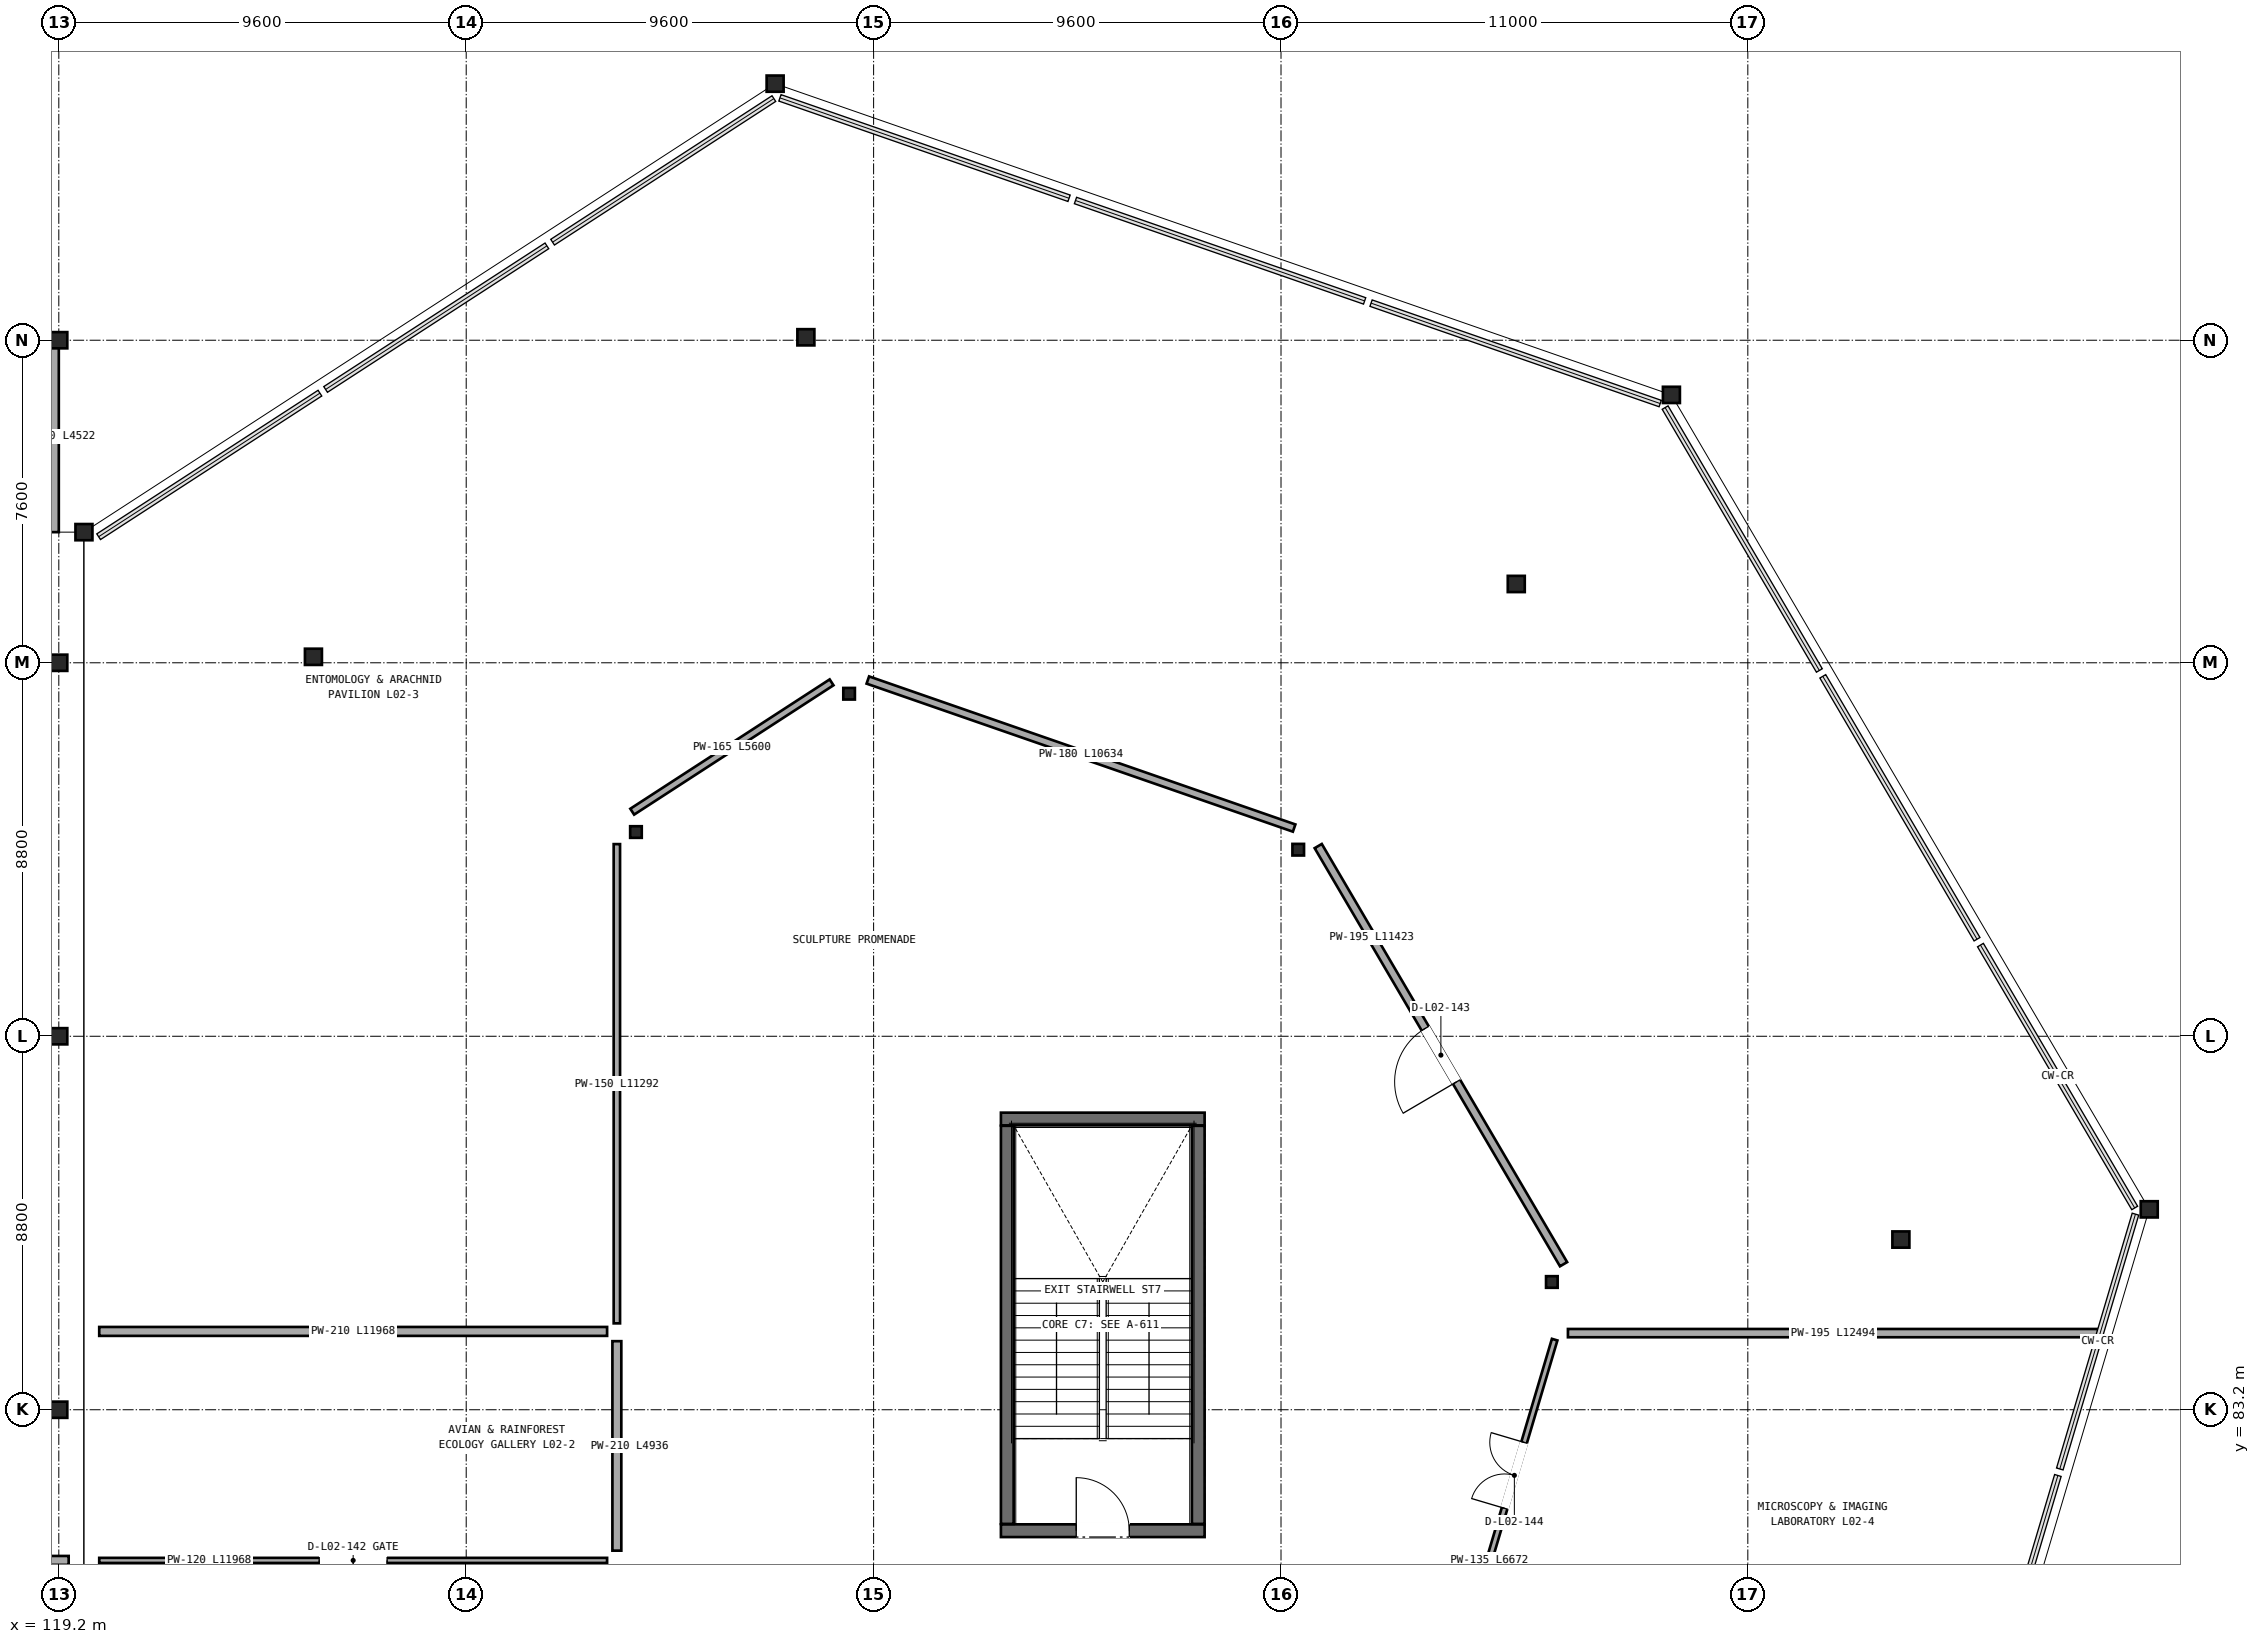
"""IFC4 building model, lengths in metres.
Left out: names, types, materials, properties, quantities, classifications, styles, units other than length and angle.
Written with IfcOpenShell. Run it as: python <this file> out.ifc"""

import sys

from ifc_helpers import new_model, si_unit, direction, frame, frame_2d, origin, origin_2d, place, context, subcontext, project, spatial, rectangle, hollow_circle, i_section, extrude, element, fill, save


model = new_model("IFC4")
c1 = context("Model", 3, precision=1e-05, world=origin(), true_north=direction((0.0, 1.0)))
c2 = subcontext(c1, "Body", "Model", "MODEL_VIEW")
j1 = project(units=[si_unit("LENGTHUNIT", "METRE"), si_unit("PLANEANGLEUNIT", "RADIAN")], contexts=[c1])
p1 = place(None, origin())
s1 = spatial("IfcSite", under=j1, at=p1, CompositionType="ELEMENT")
p2 = place(p1, origin())
s2 = spatial("IfcBuilding", under=s1, at=p2, CompositionType="ELEMENT")
p3 = place(p2, frame((0.0, 0.0, 10.1)))
s3 = spatial("IfcBuildingStorey", under=s2, at=p3, CompositionType="ELEMENT", Elevation=10.1)
for number, where, z_axis, x_axis in (
    (1, (119.2, 83.2, 0.0), (0.0, 0.0, 1.0), (1.0, 0.0, 0.0)),
    (2, (119.2, 92.0, 0.0), (0.0, 0.0, 1.0), (1.0, 0.0, 0.0)),
    (3, (119.2, 100.8, 0.0), (0.0, 0.0, 1.0), (1.0, 0.0, 0.0)),
    (4, (119.2, 108.4, 0.0), (0.0, 0.0, 1.0), (1.0, 0.0, 0.0)),
):
    element("IfcColumn", number, at=place(p3, frame(where, z_axis=z_axis, x_axis=x_axis)), inside=s3, PredefinedType="COLUMN", context=c2, shape_type="SweptSolid", body=[
        extrude(i_section(OverallWidth=0.4, OverallDepth=0.382, WebThickness=0.025, FlangeThickness=0.036, at=origin_2d()), origin(), (0.0, 0.0, 1.0), 4.5),
    ])
p4 = place(p3, frame((168.459, 87.922, 0.0), z_axis=(-0.141077174184, -0.017184886083, 0.989849438356), x_axis=(0.120918155191, -0.992662480275, 0.0)))
e5 = element("IfcColumn", 5, at=p4, inside=s3, PredefinedType="COLUMN", context=c2, shape_type="SweptSolid", body=[
    extrude(i_section(OverallWidth=0.4, OverallDepth=0.382, WebThickness=0.025, FlangeThickness=0.036, at=origin_2d()), origin(), (0.0, 0.0, 1.0), 4.546),
])
p5 = place(p3, frame((162.607, 87.21, 0.0), z_axis=(0.0, 0.0, 1.0), x_axis=(1.0, 0.0, 0.0)))
e6 = element("IfcColumn", 6, at=p5, inside=s3, PredefinedType="COLUMN", context=c2, shape_type="SweptSolid", body=[
    extrude(i_section(OverallWidth=0.4, OverallDepth=0.382, WebThickness=0.025, FlangeThickness=0.036, at=origin_2d()), origin(), (0.0, 0.0, 1.0), 4.5),
])
p6 = place(p3, frame((154.382, 86.21, 0.0), z_axis=(0.0, 0.0, 1.0), x_axis=(1.0, 0.0, 0.0)))
e7 = element("IfcColumn", 7, at=p6, inside=s3, PredefinedType="COLUMN", context=c2, shape_type="SweptSolid", body=[
    extrude(hollow_circle(Radius=0.136, WallThickness=0.009, at=origin_2d()), origin(), (0.0, 0.0, 1.0), 4.5),
])
p7 = place(p3, frame((157.199, 107.112, 0.0), z_axis=(-0.088165746855, -0.107453682943, 0.990293142006), x_axis=(0.773078230677, -0.63431068827, 0.0)))
e8 = element("IfcColumn", 8, at=p7, inside=s3, PredefinedType="COLUMN", context=c2, shape_type="SweptSolid", body=[
    extrude(i_section(OverallWidth=0.4, OverallDepth=0.382, WebThickness=0.025, FlangeThickness=0.036, at=origin_2d()), origin(), (0.0, 0.0, 1.0), 4.544),
])
p8 = place(p3, frame((153.544, 102.657, 0.0), z_axis=(0.0, 0.0, 1.0), x_axis=(1.0, 0.0, 0.0)))
e9 = element("IfcColumn", 9, at=p8, inside=s3, PredefinedType="COLUMN", context=c2, shape_type="SweptSolid", body=[
    extrude(i_section(OverallWidth=0.4, OverallDepth=0.382, WebThickness=0.025, FlangeThickness=0.036, at=origin_2d()), origin(), (0.0, 0.0, 1.0), 4.5),
])
p9 = place(p3, frame((148.406, 96.396, 0.0), z_axis=(0.0, 0.0, 1.0), x_axis=(1.0, 0.0, 0.0)))
e10 = element("IfcColumn", 10, at=p9, inside=s3, PredefinedType="COLUMN", context=c2, shape_type="SweptSolid", body=[
    extrude(hollow_circle(Radius=0.136, WallThickness=0.009, at=origin_2d()), origin(), (0.0, 0.0, 1.0), 4.5),
])
p10 = place(p3, frame((136.079, 114.445, 0.0), z_axis=(0.017445974662, -0.143969550907, 0.989428323013), x_axis=(0.99273780119, 0.120298204842, 0.0)))
e11 = element("IfcColumn", 11, at=p10, inside=s3, PredefinedType="COLUMN", context=c2, shape_type="SweptSolid", body=[
    extrude(i_section(OverallWidth=0.4, OverallDepth=0.382, WebThickness=0.025, FlangeThickness=0.036, at=origin_2d()), origin(), (0.0, 0.0, 1.0), 4.548),
])
p11 = place(p3, frame((136.804, 108.469, 0.0), z_axis=(0.0, 0.0, 1.0), x_axis=(1.0, 0.0, 0.0)))
e12 = element("IfcColumn", 12, at=p11, inside=s3, PredefinedType="COLUMN", context=c2, shape_type="SweptSolid", body=[
    extrude(i_section(OverallWidth=0.4, OverallDepth=0.382, WebThickness=0.025, FlangeThickness=0.036, at=origin_2d()), origin(), (0.0, 0.0, 1.0), 4.5),
])
p12 = place(p3, frame((137.823, 100.071, 0.0), z_axis=(0.0, 0.0, 1.0), x_axis=(1.0, 0.0, 0.0)))
e13 = element("IfcColumn", 13, at=p12, inside=s3, PredefinedType="COLUMN", context=c2, shape_type="SweptSolid", body=[
    extrude(hollow_circle(Radius=0.136, WallThickness=0.009, at=origin_2d()), origin(), (0.0, 0.0, 1.0), 4.5),
])
p13 = place(p3, frame((119.792, 103.878, 0.0), z_axis=(0.13021951526, -0.070716654764, 0.988960076335), x_axis=(0.477227696061, 0.878779680075, 0.0)))
e14 = element("IfcColumn", 14, at=p13, inside=s3, PredefinedType="COLUMN", context=c2, shape_type="SweptSolid", body=[
    extrude(i_section(OverallWidth=0.4, OverallDepth=0.382, WebThickness=0.025, FlangeThickness=0.036, at=origin_2d()), origin(), (0.0, 0.0, 1.0), 4.55),
])
p14 = place(p3, frame((125.2, 100.941, 0.0), z_axis=(0.0, 0.0, 1.0), x_axis=(1.0, 0.0, 0.0)))
e15 = element("IfcColumn", 15, at=p14, inside=s3, PredefinedType="COLUMN", context=c2, shape_type="SweptSolid", body=[
    extrude(i_section(OverallWidth=0.4, OverallDepth=0.382, WebThickness=0.025, FlangeThickness=0.036, at=origin_2d()), origin(), (0.0, 0.0, 1.0), 4.5),
])
p15 = place(p3, frame((132.8, 96.812, 0.0), z_axis=(0.0, 0.0, 1.0), x_axis=(1.0, 0.0, 0.0)))
e16 = element("IfcColumn", 16, at=p15, inside=s3, PredefinedType="COLUMN", context=c2, shape_type="SweptSolid", body=[
    extrude(hollow_circle(Radius=0.136, WallThickness=0.009, at=origin_2d()), origin(), (0.0, 0.0, 1.0), 4.5),
])
p16 = place(p3, frame((118.99, 103.878, 0.0), z_axis=(0.0, 0.0, 1.0), x_axis=(0.0, 1.0, 0.0)))
e17 = element("IfcWall", 17, at=p16, inside=s3, PredefinedType="SOLIDWALL", context=c2, shape_type="SweptSolid", body=[
    extrude(rectangle(XDim=4.522, YDim=0.42, at=frame_2d((2.261, 0.0))), origin(), (0.0, 0.0, 1.0), 3.628),
])
p17 = place(p3, frame((141.4, 80.35, 0.0), z_axis=(0.0, 0.0, 1.0), x_axis=(1.0, 0.0, 0.0)))
e18 = element("IfcWall", 18, at=p17, inside=s3, PredefinedType="SHEAR", context=c2, shape_type="SweptSolid", body=[
    extrude(rectangle(XDim=4.8, YDim=0.3, at=frame_2d((2.4, 0.0))), origin(), (0.0, 0.0, 1.0), 4.235),
])
p18 = place(p17, frame((1.775, 0.0, 0.0)))
e19 = element("IfcOpeningElement", 19, at=p18, cuts=e18, PredefinedType="OPENING", context=c2, shape_type="SweptSolid", body=[
    extrude(rectangle(XDim=1.25, YDim=2.2, at=frame_2d((0.625, 1.1))), frame((0.0, 0.16, 0.0), z_axis=(0.0, -1.0, 0.0), x_axis=(1.0, 0.0, 0.0)), (0.0, 0.0, 1.0), 0.32),
])
p19 = place(p3, frame((146.2, 90.05, 0.0), z_axis=(0.0, 0.0, 1.0), x_axis=(-1.0, 0.0, 0.0)))
e20 = element("IfcWall", 20, at=p19, inside=s3, PredefinedType="SHEAR", context=c2, shape_type="SweptSolid", body=[
    extrude(rectangle(XDim=4.8, YDim=0.3, at=frame_2d((2.4, 0.0))), origin(), (0.0, 0.0, 1.0), 4.235),
])
for number, where, z_axis, x_axis in (
    (21, (146.05, 80.51, 0.0), (0.0, 0.0, 1.0), (0.0, 1.0, 0.0)),
    (22, (141.55, 89.89, 0.0), (0.0, 0.0, 1.0), (0.0, -1.0, 0.0)),
):
    element("IfcWall", number, at=place(p3, frame(where, z_axis=z_axis, x_axis=x_axis)), inside=s3, PredefinedType="SHEAR", context=c2, shape_type="SweptSolid", body=[
        extrude(rectangle(XDim=9.38, YDim=0.3, at=frame_2d((4.69, 0.0))), origin(), (0.0, 0.0, 1.0), 4.235),
    ])
p20 = place(p3, frame((132.12, 79.65, 0.0), z_axis=(0.0, 0.0, 1.0), x_axis=(-1.0, 0.0, 0.0)))
e23 = element("IfcWall", 23, at=p20, inside=s3, PredefinedType="PARTITIONING", context=c2, shape_type="SweptSolid", body=[
    extrude(rectangle(XDim=11.968, YDim=0.12, at=frame_2d((5.984, 0.0))), origin(), (0.0, 0.0, 1.0), 3.51),
])
p21 = place(p20, frame((5.184, 0.0, 0.0)))
e24 = element("IfcOpeningElement", 24, at=p21, cuts=e23, PredefinedType="OPENING", context=c2, shape_type="SweptSolid", body=[
    extrude(rectangle(XDim=1.6, YDim=2.1, at=frame_2d((0.8, 1.05))), frame((0.0, 0.07, 0.0), z_axis=(0.0, -1.0, 0.0), x_axis=(1.0, 0.0, 0.0)), (0.0, 0.0, 1.0), 0.14),
])
p22 = place(p3, frame((132.35, 84.815, 0.0), z_axis=(0.0, 0.0, 1.0), x_axis=(0.0, -1.0, 0.0)))
e25 = element("IfcWall", 25, at=p22, inside=s3, PredefinedType="PARTITIONING", context=c2, shape_type="SweptSolid", body=[
    extrude(rectangle(XDim=4.936, YDim=0.21, at=frame_2d((2.468, 0.0))), origin(), (0.0, 0.0, 1.0), 4.13),
])
p23 = place(p3, frame((154.658, 86.629, 0.0), z_axis=(0.0, 0.0, 1.0), x_axis=(-0.506044714384, 0.862507244633, 0.0)))
e26 = element("IfcWall", 26, at=p23, inside=s3, PredefinedType="PARTITIONING", context=c2, shape_type="SweptSolid", body=[
    extrude(rectangle(XDim=11.423, YDim=0.195, at=frame_2d((5.712, 0.0))), origin(), (0.0, 0.0, 1.0), 3.41),
])
p24 = place(p23, frame((4.982, 0.0, 0.0)))
e27 = element("IfcOpeningElement", 27, at=p24, cuts=e26, PredefinedType="OPENING", context=c2, shape_type="SweptSolid", body=[
    extrude(rectangle(XDim=1.46, YDim=2.46, at=frame_2d((0.73, 1.23))), frame((0.0, 0.107, 0.0), z_axis=(0.0, -1.0, 0.0), x_axis=(1.0, 0.0, 0.0)), (0.0, 0.0, 1.0), 0.215),
])
p25 = place(p3, frame((148.309, 96.906, 0.0), z_axis=(0.0, 0.0, 1.0), x_axis=(-0.944672280914, 0.328015672907, 0.0)))
e28 = element("IfcWall", 28, at=p25, inside=s3, PredefinedType="PARTITIONING", context=c2, shape_type="SweptSolid", body=[
    extrude(rectangle(XDim=10.634, YDim=0.18, at=frame_2d((5.317, 0.0))), origin(), (0.0, 0.0, 1.0), 4.13),
])
p26 = place(p3, frame((137.409, 100.339, 0.0), z_axis=(0.0, 0.0, 1.0), x_axis=(-0.838914477988, -0.544263262238, 0.0)))
e29 = element("IfcWall", 29, at=p26, inside=s3, PredefinedType="PARTITIONING", context=c2, shape_type="SweptSolid", body=[
    extrude(rectangle(XDim=5.6, YDim=0.165, at=frame_2d((2.8, 0.0))), origin(), (0.0, 0.0, 1.0), 4.13),
])
p27 = place(p3, frame((132.35, 96.527, 0.0), z_axis=(0.0, 0.0, 1.0), x_axis=(0.0, -1.0, 0.0)))
e30 = element("IfcWall", 30, at=p27, inside=s3, PredefinedType="PARTITIONING", context=c2, shape_type="SweptSolid", body=[
    extrude(rectangle(XDim=11.292, YDim=0.15, at=frame_2d((5.646, 0.0))), origin(), (0.0, 0.0, 1.0), 4.13),
])
p28 = place(p3, frame((152.549, 78.456, 0.0), z_axis=(0.0, 0.0, 1.0), x_axis=(0.284570440506, 0.958655133189, 0.0)))
e31 = element("IfcWall", 31, at=p28, inside=s3, PredefinedType="PARTITIONING", context=c2, shape_type="SweptSolid", body=[
    extrude(rectangle(XDim=6.672, YDim=0.135, at=frame_2d((3.336, 0.0))), origin(), (0.0, 0.0, 1.0), 4.13),
])
p29 = place(p28, frame((2.526, 0.0, 0.0)))
e32 = element("IfcOpeningElement", 32, at=p29, cuts=e31, PredefinedType="OPENING", context=c2, shape_type="SweptSolid", body=[
    extrude(rectangle(XDim=1.62, YDim=2.46, at=frame_2d((0.81, 1.23))), frame((0.0, 0.078, 0.0), z_axis=(0.0, -1.0, 0.0), x_axis=(1.0, 0.0, 0.0)), (0.0, 0.0, 1.0), 0.155),
])
p30 = place(p3, frame((119.432, 79.65, 0.0), z_axis=(0.0, 0.0, 1.0), x_axis=(-1.0, 0.0, 0.0)))
e33 = element("IfcWall", 33, at=p30, inside=s3, PredefinedType="PARTITIONING", context=c2, shape_type="SweptSolid", body=[
    extrude(rectangle(XDim=9.382, YDim=0.21, at=frame_2d((4.691, 0.0))), origin(), (0.0, 0.0, 1.0), 3.763),
])
p31 = place(p3, frame((120.152, 85.045, 0.0), z_axis=(0.0, 0.0, 1.0), x_axis=(1.0, 0.0, 0.0)))
e34 = element("IfcWall", 34, at=p31, inside=s3, PredefinedType="PARTITIONING", context=c2, shape_type="SweptSolid", body=[
    extrude(rectangle(XDim=11.968, YDim=0.21, at=frame_2d((5.984, 0.0))), origin(), (0.0, 0.0, 1.0), 3.51),
])
p32 = place(p3, frame((167.255, 85.006, 0.0), z_axis=(0.0, 0.0, 1.0), x_axis=(-1.0, 0.0, 0.0)))
e35 = element("IfcWall", 35, at=p32, inside=s3, PredefinedType="PARTITIONING", context=c2, shape_type="SweptSolid", body=[
    extrude(rectangle(XDim=12.494, YDim=0.195, at=frame_2d((6.247, 0.0))), origin(), (0.0, 0.0, 1.0), 2.75),
])
p33 = place(p18, origin())
e36 = element("IfcDoor", 36, at=p33, inside=s3, OperationType="SINGLE_SWING_LEFT", PredefinedType="DOOR", context=c2, shape_type="SweptSolid", body=[
    extrude(rectangle(XDim=1.25, YDim=2.2, at=frame_2d((0.625, 1.1))), frame((0.0, 0.025, 0.0), z_axis=(0.0, -1.0, 0.0), x_axis=(1.0, 0.0, 0.0)), (0.0, 0.0, 1.0), 0.05),
])
fill(e19, e36)
p34 = place(p21, origin())
e37 = element("IfcDoor", 37, at=p34, inside=s3, OperationType="DOUBLE_DOOR_SINGLE_SWING", PredefinedType="GATE", context=c2, shape_type="SweptSolid", body=[
    extrude(rectangle(XDim=1.6, YDim=2.1, at=frame_2d((0.8, 1.05))), frame((0.0, 0.025, 0.0), z_axis=(0.0, -1.0, 0.0), x_axis=(1.0, 0.0, 0.0)), (0.0, 0.0, 1.0), 0.05),
])
fill(e24, e37)
p35 = place(p24, origin())
e38 = element("IfcDoor", 38, at=p35, inside=s3, OperationType="SINGLE_SWING_LEFT", PredefinedType="DOOR", context=c2, shape_type="SweptSolid", body=[
    extrude(rectangle(XDim=1.46, YDim=2.46, at=frame_2d((0.73, 1.23))), frame((0.0, 0.025, 0.0), z_axis=(0.0, -1.0, 0.0), x_axis=(1.0, 0.0, 0.0)), (0.0, 0.0, 1.0), 0.05),
])
fill(e27, e38)
p36 = place(p29, origin())
e39 = element("IfcDoor", 39, at=p36, inside=s3, OperationType="DOUBLE_DOOR_SINGLE_SWING", PredefinedType="DOOR", context=c2, shape_type="SweptSolid", body=[
    extrude(rectangle(XDim=1.62, YDim=2.46, at=frame_2d((0.81, 1.23))), frame((0.0, 0.025, 0.0), z_axis=(0.0, -1.0, 0.0), x_axis=(1.0, 0.0, 0.0)), (0.0, 0.0, 1.0), 0.05),
])
fill(e32, e39)
save(model, sys.argv[1])
